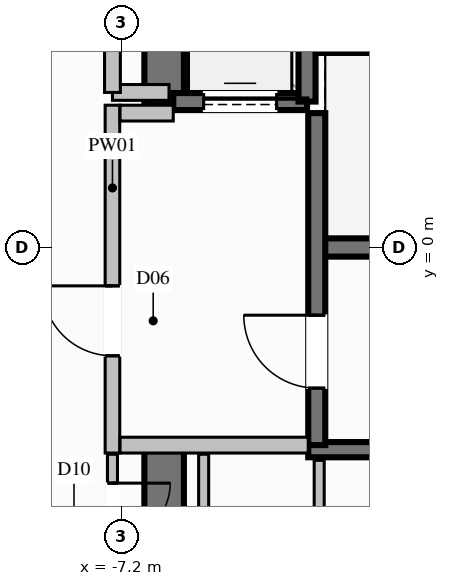
"""IFC4 building model, lengths in metres.
Left out: names, types, materials, properties, quantities, classifications, styles, units other than length and angle.
Written with IfcOpenShell. Run it as: python <this file> out.ifc"""

import sys

from ifc_helpers import new_model, si_unit, direction, frame, frame_2d, origin, place, context, subcontext, project, spatial, rectangle, extrude, element, fill, save


model = new_model("IFC4")
c1 = context("Model", 3, precision=1e-05, world=origin(), true_north=direction((0.0, 1.0)))
c2 = subcontext(c1, "Body", "Model", "MODEL_VIEW")
j1 = project(units=[si_unit("LENGTHUNIT", "METRE"), si_unit("PLANEANGLEUNIT", "RADIAN")], contexts=[c1])
p1 = place(None, origin())
s1 = spatial("IfcSite", under=j1, at=p1, CompositionType="ELEMENT")
p2 = place(p1, origin())
s2 = spatial("IfcBuilding", under=s1, at=p2, CompositionType="ELEMENT")
p3 = place(p2, frame((0.0, 0.0, 138.6)))
s3 = spatial("IfcBuildingStorey", under=s2, at=p3, CompositionType="ELEMENT", Elevation=138.6)
p4 = place(p3, frame((-3.99, 0.0, 0.0), z_axis=(0.0, 0.0, 1.0), x_axis=(1.0, 0.0, 0.0)))
e1 = element("IfcWall", 1, at=p4, inside=s3, PredefinedType="SHEAR", context=c2, shape_type="SweptSolid", body=[
    extrude(rectangle(XDim=7.98, YDim=0.3, at=frame_2d((3.99, 0.0))), origin(), (0.0, 0.0, 1.0), 3.6),
])
for number, where, z_axis, x_axis in (
    (2, (-4.13, -3.325, 0.0), (0.0, 0.0, 1.0), (1.0, 0.0, 0.0)),
    (3, (-4.13, 3.325, 0.0), (0.0, 0.0, 1.0), (1.0, 0.0, 0.0)),
):
    element("IfcWall", number, at=place(p3, frame(where, z_axis=z_axis, x_axis=x_axis)), inside=s3, PredefinedType="SOLIDWALL", context=c2, shape_type="SweptSolid", body=[
        extrude(rectangle(XDim=8.26, YDim=0.25, at=frame_2d((4.13, 0.0))), origin(), (0.0, 0.0, 1.0), 3.6),
    ])
p5 = place(p3, frame((-6.5, 2.35, 0.0), z_axis=(0.0, 0.0, 1.0), x_axis=(0.0, 1.0, 0.0)))
e4 = element("IfcWall", 4, at=p5, inside=s3, PredefinedType="SHEAR", context=c2, shape_type="SweptSolid", body=[
    extrude(rectangle(XDim=4.075, YDim=0.65, at=frame_2d((2.038, 0.0))), origin(), (0.0, 0.0, 1.0), 3.6),
])
p6 = place(p3, frame((-6.5, -6.425, 0.0), z_axis=(0.0, 0.0, 1.0), x_axis=(0.0, 1.0, 0.0)))
e5 = element("IfcWall", 5, at=p6, inside=s3, PredefinedType="SHEAR", context=c2, shape_type="SweptSolid", body=[
    extrude(rectangle(XDim=3.075, YDim=0.65, at=frame_2d((1.538, 0.0))), origin(), (0.0, 0.0, 1.0), 3.6),
])
p7 = place(p3, frame((-6.35, 2.4, 0.0), z_axis=(0.0, 0.0, 1.0), x_axis=(1.0, 0.0, 0.0)))
e6 = element("IfcWall", 6, at=p7, inside=s3, PredefinedType="SOLIDWALL", context=c2, shape_type="SweptSolid", body=[
    extrude(rectangle(XDim=2.2, YDim=0.28, at=frame_2d((1.1, 0.0))), origin(), (0.0, 0.0, 1.0), 3.35),
])
p8 = place(p7, frame((0.5, 0.0, 0.0)))
e7 = element("IfcOpeningElement", 7, at=p8, cuts=e6, PredefinedType="OPENING", context=c2, shape_type="SweptSolid", body=[
    extrude(rectangle(XDim=1.2, YDim=2.2, at=frame_2d((0.6, 1.1))), frame((0.0, 0.15, 0.0), z_axis=(0.0, -1.0, 0.0), x_axis=(1.0, 0.0, 0.0)), (0.0, 0.0, 1.0), 0.3),
])
p9 = place(p3, frame((-4.15, 2.4, 0.0), z_axis=(0.0, 0.0, 1.0), x_axis=(0.0, 1.0, 0.0)))
e8 = element("IfcWall", 8, at=p9, inside=s3, PredefinedType="SOLIDWALL", context=c2, shape_type="SweptSolid", body=[
    extrude(rectangle(XDim=2.7, YDim=0.28, at=frame_2d((1.35, 0.0))), origin(), (0.0, 0.0, 1.0), 3.35),
])
p10 = place(p3, frame((-3.99, -3.25, 0.0), z_axis=(0.0, 0.0, 1.0), x_axis=(0.0, 1.0, 0.0)))
e9 = element("IfcWall", 9, at=p10, inside=s3, PredefinedType="SOLIDWALL", context=c2, shape_type="SweptSolid", body=[
    extrude(rectangle(XDim=5.46, YDim=0.28, at=frame_2d((2.73, 0.0))), origin(), (0.0, 0.0, 1.0), 3.35),
])
p11 = place(p10, frame((0.937, 0.0, 0.0)))
e10 = element("IfcOpeningElement", 10, at=p11, cuts=e9, PredefinedType="OPENING", context=c2, shape_type="SweptSolid", body=[
    extrude(rectangle(XDim=1.2, YDim=2.2, at=frame_2d((0.6, 1.1))), frame((0.0, 0.15, 0.0), z_axis=(0.0, -1.0, 0.0), x_axis=(1.0, 0.0, 0.0)), (0.0, 0.0, 1.0), 0.3),
])
p12 = place(p3, frame((-7.35, -3.38, 0.0), z_axis=(0.0, 0.0, 1.0), x_axis=(0.0, 1.0, 0.0)))
e11 = element("IfcWall", 11, at=p12, inside=s3, PredefinedType="PARTITIONING", context=c2, shape_type="SweptSolid", body=[
    extrude(rectangle(XDim=5.72, YDim=0.24, at=frame_2d((2.86, 0.0))), origin(), (0.0, 0.0, 1.0), 2.435),
])
p13 = place(p12, frame((1.599, 0.0, 0.0)))
e12 = element("IfcOpeningElement", 12, at=p13, cuts=e11, PredefinedType="OPENING", context=c2, shape_type="SweptSolid", body=[
    extrude(rectangle(XDim=1.15, YDim=2.2, at=frame_2d((0.575, 1.1))), frame((0.0, 0.13, 0.0), z_axis=(0.0, -1.0, 0.0), x_axis=(1.0, 0.0, 0.0)), (0.0, 0.0, 1.0), 0.26),
])
p14 = place(p3, frame((-7.225, -3.25, 0.0), z_axis=(0.0, 0.0, 1.0), x_axis=(1.0, 0.0, 0.0)))
e13 = element("IfcWall", 13, at=p14, inside=s3, PredefinedType="PARTITIONING", context=c2, shape_type="SweptSolid", body=[
    extrude(rectangle(XDim=3.095, YDim=0.26, at=frame_2d((1.548, 0.0))), origin(), (0.0, 0.0, 1.0), 3.35),
])
p15 = place(p3, frame((-7.225, 2.21, 0.0), z_axis=(0.0, 0.0, 1.0), x_axis=(1.0, 0.0, 0.0)))
e14 = element("IfcWall", 14, at=p15, inside=s3, PredefinedType="PARTITIONING", context=c2, shape_type="SweptSolid", body=[
    extrude(rectangle(XDim=0.875, YDim=0.26, at=frame_2d((0.438, 0.0))), origin(), (0.0, 0.0, 1.0), 3.35),
])
p16 = place(p3, frame((-7.35, 2.55, 0.0), z_axis=(0.0, 0.0, 1.0), x_axis=(1.0, 0.0, 0.0)))
e15 = element("IfcWall", 15, at=p16, inside=s3, PredefinedType="PARTITIONING", context=c2, shape_type="SweptSolid", body=[
    extrude(rectangle(XDim=0.93, YDim=0.26, at=frame_2d((0.465, 0.0))), origin(), (0.0, 0.0, 1.0), 3.35),
])
p17 = place(p3, frame((-7.35, 2.55, 0.0), z_axis=(0.0, 0.0, 1.0), x_axis=(0.0, 1.0, 0.0)))
e16 = element("IfcWall", 16, at=p17, inside=s3, PredefinedType="PARTITIONING", context=c2, shape_type="SweptSolid", body=[
    extrude(rectangle(XDim=2.4, YDim=0.26, at=frame_2d((1.2, 0.0))), origin(), (0.0, 0.0, 1.0), 2.435),
])
p18 = place(p17, frame((0.775, 0.0, 0.0)))
e17 = element("IfcOpeningElement", 17, at=p18, cuts=e16, PredefinedType="OPENING", context=c2, shape_type="SweptSolid", body=[
    extrude(rectangle(XDim=0.85, YDim=2.05, at=frame_2d((0.425, 1.025))), frame((0.0, 0.14, 0.0), z_axis=(0.0, -1.0, 0.0), x_axis=(1.0, 0.0, 0.0)), (0.0, 0.0, 1.0), 0.28),
])
p19 = place(p3, frame((-5.85, -5.3, 0.0), z_axis=(0.0, 0.0, 1.0), x_axis=(0.0, 1.0, 0.0)))
e18 = element("IfcWall", 18, at=p19, inside=s3, PredefinedType="PARTITIONING", context=c2, shape_type="SweptSolid", body=[
    extrude(rectangle(XDim=1.9, YDim=0.165, at=frame_2d((0.95, 0.0))), origin(), (0.0, 0.0, 1.0), 2.435),
])
p20 = place(p3, frame((-7.35, -3.4, 0.0), z_axis=(0.0, 0.0, 1.0), x_axis=(0.0, -1.0, 0.0)))
e19 = element("IfcWall", 19, at=p20, inside=s3, PredefinedType="PARTITIONING", context=c2, shape_type="SweptSolid", body=[
    extrude(rectangle(XDim=1.9, YDim=0.165, at=frame_2d((0.95, 0.0))), origin(), (0.0, 0.0, 1.0), 3.35),
])
p21 = place(p20, frame((0.475, 0.0, 0.0)))
e20 = element("IfcOpeningElement", 20, at=p21, cuts=e19, PredefinedType="OPENING", context=c2, shape_type="SweptSolid", body=[
    extrude(rectangle(XDim=0.95, YDim=2.1, at=frame_2d((0.475, 1.05))), frame((0.0, 0.093, 0.0), z_axis=(0.0, -1.0, 0.0), x_axis=(1.0, 0.0, 0.0)), (0.0, 0.0, 1.0), 0.185),
])
p22 = place(p3, frame((-3.95, -3.5, 0.0), z_axis=(0.0, 0.0, 1.0), x_axis=(0.0, -1.0, 0.0)))
e21 = element("IfcWall", 21, at=p22, inside=s3, PredefinedType="PARTITIONING", context=c2, shape_type="SweptSolid", body=[
    extrude(rectangle(XDim=3.35, YDim=0.165, at=frame_2d((1.675, 0.0))), origin(), (0.0, 0.0, 1.0), 3.35),
])
p23 = place(p8, origin())
e22 = element("IfcDoor", 22, at=p23, inside=s3, OperationType="SLIDING_TO_LEFT", PredefinedType="DOOR", context=c2, shape_type="SweptSolid", body=[
    extrude(rectangle(XDim=1.2, YDim=2.2, at=frame_2d((0.6, 1.1))), frame((0.0, 0.025, 0.0), z_axis=(0.0, -1.0, 0.0), x_axis=(1.0, 0.0, 0.0)), (0.0, 0.0, 1.0), 0.05),
])
fill(e7, e22)
p24 = place(p11, origin())
e23 = element("IfcDoor", 23, at=p24, inside=s3, OperationType="SINGLE_SWING_RIGHT", PredefinedType="DOOR", context=c2, shape_type="SweptSolid", body=[
    extrude(rectangle(XDim=1.2, YDim=2.2, at=frame_2d((0.6, 1.1))), frame((0.0, 0.025, 0.0), z_axis=(0.0, -1.0, 0.0), x_axis=(1.0, 0.0, 0.0)), (0.0, 0.0, 1.0), 0.05),
])
fill(e10, e23)
p25 = place(p13, origin())
e24 = element("IfcDoor", 24, at=p25, inside=s3, OperationType="SINGLE_SWING_RIGHT", PredefinedType="DOOR", context=c2, shape_type="SweptSolid", body=[
    extrude(rectangle(XDim=1.15, YDim=2.2, at=frame_2d((0.575, 1.1))), frame((0.0, 0.025, 0.0), z_axis=(0.0, -1.0, 0.0), x_axis=(1.0, 0.0, 0.0)), (0.0, 0.0, 1.0), 0.05),
])
fill(e12, e24)
p26 = place(p21, origin())
e25 = element("IfcDoor", 25, at=p26, inside=s3, OperationType="SINGLE_SWING_LEFT", PredefinedType="DOOR", context=c2, shape_type="SweptSolid", body=[
    extrude(rectangle(XDim=0.95, YDim=2.1, at=frame_2d((0.475, 1.05))), frame((0.0, 0.025, 0.0), z_axis=(0.0, -1.0, 0.0), x_axis=(1.0, 0.0, 0.0)), (0.0, 0.0, 1.0), 0.05),
])
fill(e20, e25)
save(model, sys.argv[1])
